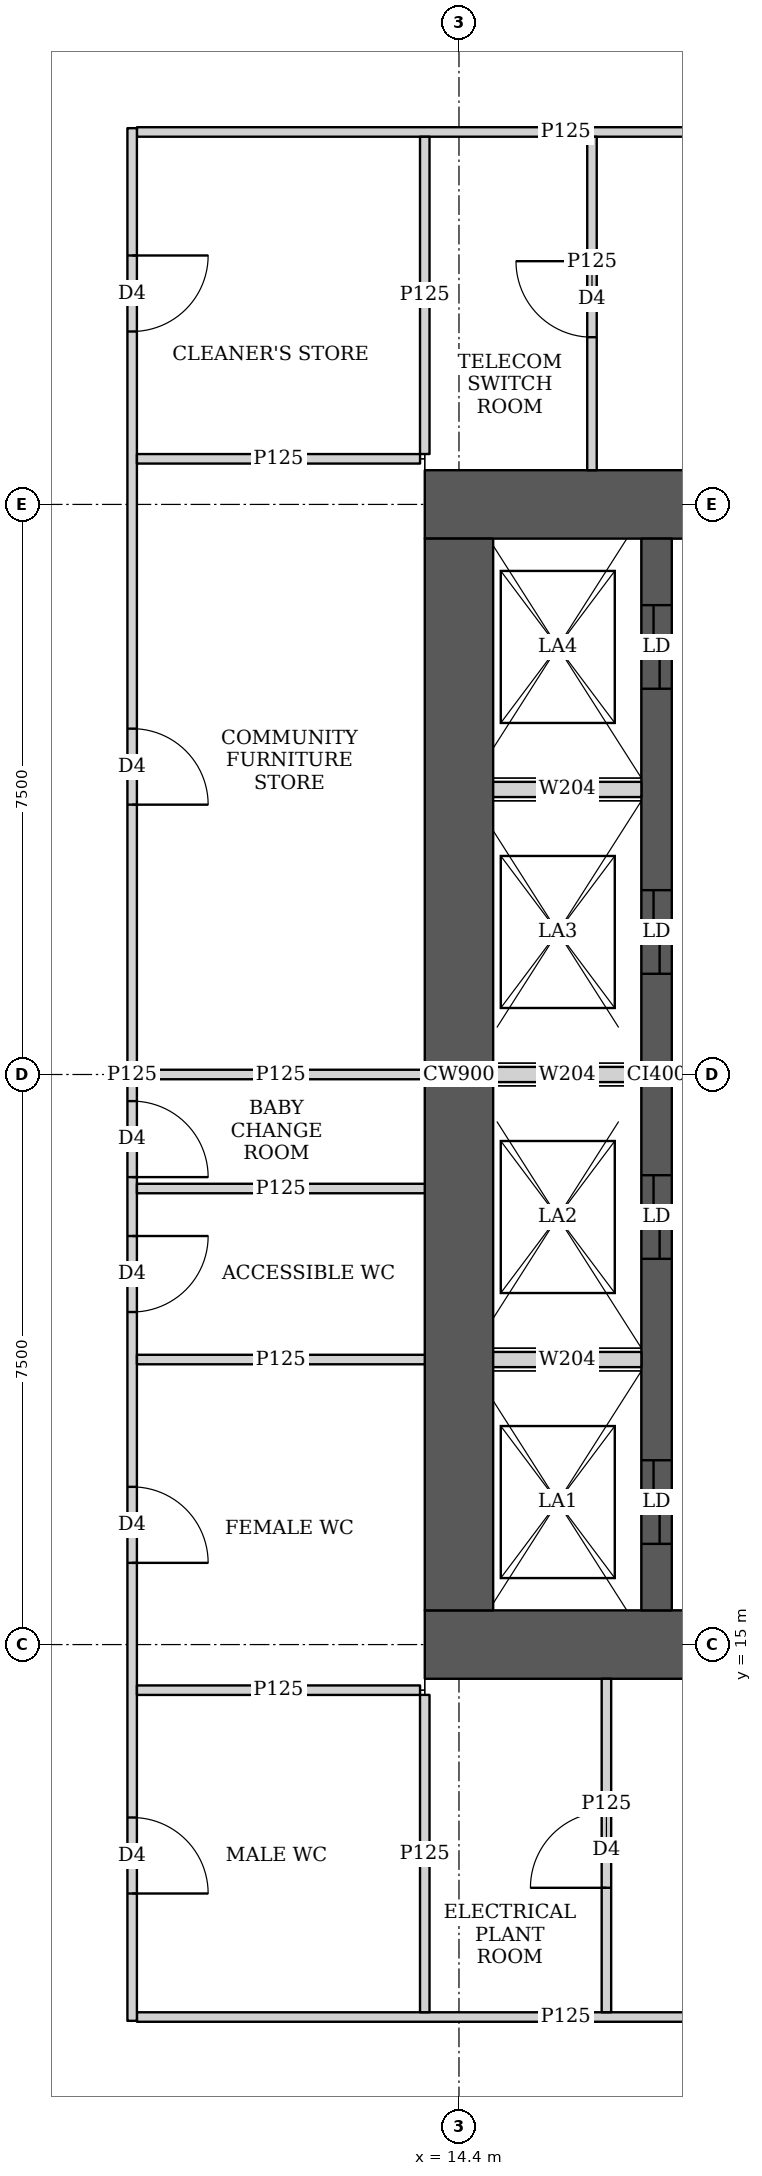
"""IFC4 building model, lengths in metres.
Left out: names, types, materials, properties, quantities, classifications, styles, units other than length and angle.
Written with IfcOpenShell. Run it as: python <this file> out.ifc"""

import sys

from ifc_helpers import new_model, si_unit, direction, frame, frame_2d, origin, place, context, subcontext, project, spatial, rectangle, extrude, element, fill, save


model = new_model("IFC4")
c1 = context("Model", 3, precision=1e-05, world=origin(), true_north=direction((0.0, 1.0)))
c2 = subcontext(c1, "Body", "Model", "MODEL_VIEW")
j1 = project(units=[si_unit("LENGTHUNIT", "METRE"), si_unit("PLANEANGLEUNIT", "RADIAN")], contexts=[c1])
p1 = place(None, origin())
s1 = spatial("IfcSite", under=j1, at=p1, CompositionType="ELEMENT")
p2 = place(p1, origin())
s2 = spatial("IfcBuilding", under=s1, at=p2, CompositionType="ELEMENT")
p3 = place(p2, frame((0.0, 0.0, 130.4)))
s3 = spatial("IfcBuildingStorey", under=s2, at=p3, CompositionType="ELEMENT", Elevation=130.4)
p4 = place(p3, frame((13.95, 15.0, 0.0), z_axis=(0.0, 0.0, 1.0), x_axis=(1.0, 0.0, 0.0)))
e1 = element("IfcWall", 1, at=p4, inside=s3, PredefinedType="SHEAR", context=c2, shape_type="SweptSolid", body=[
    extrude(rectangle(XDim=15.3, YDim=0.9, at=frame_2d((7.65, 0.0))), origin(), (0.0, 0.0, 1.0), 5.4),
])
p5 = place(p4, frame((4.45, 0.0, 0.0)))
e2 = element("IfcOpeningElement", 2, at=p5, cuts=e1, PredefinedType="OPENING", context=c2, shape_type="SweptSolid", body=[
    extrude(rectangle(XDim=1.8, YDim=2.1, at=frame_2d((0.9, 1.05))), frame((0.0, 0.46, 0.0), z_axis=(0.0, -1.0, 0.0), x_axis=(1.0, 0.0, 0.0)), (0.0, 0.0, 1.0), 0.92),
])
p6 = place(p4, frame((10.7, 0.0, 0.0)))
e3 = element("IfcOpeningElement", 3, at=p6, cuts=e1, PredefinedType="OPENING", context=c2, shape_type="SweptSolid", body=[
    extrude(rectangle(XDim=1.1, YDim=2.1, at=frame_2d((0.55, 1.05))), frame((0.0, 0.46, 0.0), z_axis=(0.0, -1.0, 0.0), x_axis=(1.0, 0.0, 0.0)), (0.0, 0.0, 1.0), 0.92),
])
p7 = place(p3, frame((13.95, 30.0, 0.0), z_axis=(0.0, 0.0, 1.0), x_axis=(1.0, 0.0, 0.0)))
e4 = element("IfcWall", 4, at=p7, inside=s3, PredefinedType="SHEAR", context=c2, shape_type="SweptSolid", body=[
    extrude(rectangle(XDim=15.3, YDim=0.9, at=frame_2d((7.65, 0.0))), origin(), (0.0, 0.0, 1.0), 5.4),
])
p8 = place(p7, frame((4.45, 0.0, 0.0)))
e5 = element("IfcOpeningElement", 5, at=p8, cuts=e4, PredefinedType="OPENING", context=c2, shape_type="SweptSolid", body=[
    extrude(rectangle(XDim=1.8, YDim=2.1, at=frame_2d((0.9, 1.05))), frame((0.0, 0.46, 0.0), z_axis=(0.0, -1.0, 0.0), x_axis=(1.0, 0.0, 0.0)), (0.0, 0.0, 1.0), 0.92),
])
p9 = place(p7, frame((10.7, 0.0, 0.0)))
e6 = element("IfcOpeningElement", 6, at=p9, cuts=e4, PredefinedType="OPENING", context=c2, shape_type="SweptSolid", body=[
    extrude(rectangle(XDim=1.1, YDim=2.1, at=frame_2d((0.55, 1.05))), frame((0.0, 0.46, 0.0), z_axis=(0.0, -1.0, 0.0), x_axis=(1.0, 0.0, 0.0)), (0.0, 0.0, 1.0), 0.92),
])
p10 = place(p3, frame((14.4, 15.45, 0.0), z_axis=(0.0, 0.0, 1.0), x_axis=(0.0, 1.0, 0.0)))
e7 = element("IfcWall", 7, at=p10, inside=s3, PredefinedType="SHEAR", context=c2, shape_type="SweptSolid", body=[
    extrude(rectangle(XDim=14.1, YDim=0.9, at=frame_2d((7.05, 0.0))), origin(), (0.0, 0.0, 1.0), 5.4),
])
p11 = place(p3, frame((17.0, 15.45, 0.0), z_axis=(0.0, 0.0, 1.0), x_axis=(0.0, 1.0, 0.0)))
e8 = element("IfcWall", 8, at=p11, inside=s3, PredefinedType="SHEAR", context=c2, shape_type="SweptSolid", body=[
    extrude(rectangle(XDim=14.1, YDim=0.4, at=frame_2d((7.05, 0.0))), origin(), (0.0, 0.0, 1.0), 5.4),
])
p12 = place(p11, frame((0.875, 0.0, 0.0)))
e9 = element("IfcOpeningElement", 9, at=p12, cuts=e8, PredefinedType="OPENING", context=c2, shape_type="SweptSolid", body=[
    extrude(rectangle(XDim=1.1, YDim=2.1, at=frame_2d((0.55, 1.05))), frame((0.0, 0.21, 0.0), z_axis=(0.0, -1.0, 0.0), x_axis=(1.0, 0.0, 0.0)), (0.0, 0.0, 1.0), 0.42),
])
p13 = place(p11, frame((4.625, 0.0, 0.0)))
e10 = element("IfcOpeningElement", 10, at=p13, cuts=e8, PredefinedType="OPENING", context=c2, shape_type="SweptSolid", body=[
    extrude(rectangle(XDim=1.1, YDim=2.1, at=frame_2d((0.55, 1.05))), frame((0.0, 0.21, 0.0), z_axis=(0.0, -1.0, 0.0), x_axis=(1.0, 0.0, 0.0)), (0.0, 0.0, 1.0), 0.42),
])
p14 = place(p11, frame((8.375, 0.0, 0.0)))
e11 = element("IfcOpeningElement", 11, at=p14, cuts=e8, PredefinedType="OPENING", context=c2, shape_type="SweptSolid", body=[
    extrude(rectangle(XDim=1.1, YDim=2.1, at=frame_2d((0.55, 1.05))), frame((0.0, 0.21, 0.0), z_axis=(0.0, -1.0, 0.0), x_axis=(1.0, 0.0, 0.0)), (0.0, 0.0, 1.0), 0.42),
])
p15 = place(p11, frame((12.125, 0.0, 0.0)))
e12 = element("IfcOpeningElement", 12, at=p15, cuts=e8, PredefinedType="OPENING", context=c2, shape_type="SweptSolid", body=[
    extrude(rectangle(XDim=1.1, YDim=2.1, at=frame_2d((0.55, 1.05))), frame((0.0, 0.21, 0.0), z_axis=(0.0, -1.0, 0.0), x_axis=(1.0, 0.0, 0.0)), (0.0, 0.0, 1.0), 0.42),
])
p16 = place(p3, frame((10.1, 10.05, 0.0), z_axis=(0.0, 0.0, 1.0), x_axis=(0.0, 1.0, 0.0)))
e13 = element("IfcWall", 13, at=p16, inside=s3, PredefinedType="PARTITIONING", context=c2, shape_type="SweptSolid", body=[
    extrude(rectangle(XDim=24.9, YDim=0.125, at=frame_2d((12.45, 0.0))), origin(), (0.0, 0.0, 1.0), 3.55),
])
p17 = place(p16, frame((1.675, 0.0, 0.0)))
e14 = element("IfcOpeningElement", 14, at=p17, cuts=e13, PredefinedType="OPENING", context=c2, shape_type="SweptSolid", body=[
    extrude(rectangle(XDim=1.0, YDim=2.1, at=frame_2d((0.5, 1.05))), frame((0.0, 0.073, 0.0), z_axis=(0.0, -1.0, 0.0), x_axis=(1.0, 0.0, 0.0)), (0.0, 0.0, 1.0), 0.145),
])
p18 = place(p16, frame((16.0, 0.0, 0.0)))
e15 = element("IfcOpeningElement", 15, at=p18, cuts=e13, PredefinedType="OPENING", context=c2, shape_type="SweptSolid", body=[
    extrude(rectangle(XDim=1.0, YDim=2.1, at=frame_2d((0.5, 1.05))), frame((0.0, 0.073, 0.0), z_axis=(0.0, -1.0, 0.0), x_axis=(1.0, 0.0, 0.0)), (0.0, 0.0, 1.0), 0.145),
])
p19 = place(p16, frame((22.225, 0.0, 0.0)))
e16 = element("IfcOpeningElement", 16, at=p19, cuts=e13, PredefinedType="OPENING", context=c2, shape_type="SweptSolid", body=[
    extrude(rectangle(XDim=1.0, YDim=2.1, at=frame_2d((0.5, 1.05))), frame((0.0, 0.073, 0.0), z_axis=(0.0, -1.0, 0.0), x_axis=(1.0, 0.0, 0.0)), (0.0, 0.0, 1.0), 0.145),
])
p20 = place(p16, frame((6.025, 0.0, 0.0)))
e17 = element("IfcOpeningElement", 17, at=p20, cuts=e13, PredefinedType="OPENING", context=c2, shape_type="SweptSolid", body=[
    extrude(rectangle(XDim=1.0, YDim=2.1, at=frame_2d((0.5, 1.05))), frame((0.0, 0.073, 0.0), z_axis=(0.0, -1.0, 0.0), x_axis=(1.0, 0.0, 0.0)), (0.0, 0.0, 1.0), 0.145),
])
p21 = place(p16, frame((9.325, 0.0, 0.0)))
e18 = element("IfcOpeningElement", 18, at=p21, cuts=e13, PredefinedType="OPENING", context=c2, shape_type="SweptSolid", body=[
    extrude(rectangle(XDim=1.0, YDim=2.1, at=frame_2d((0.5, 1.05))), frame((0.0, 0.073, 0.0), z_axis=(0.0, -1.0, 0.0), x_axis=(1.0, 0.0, 0.0)), (0.0, 0.0, 1.0), 0.145),
])
p22 = place(p16, frame((11.1, 0.0, 0.0)))
e19 = element("IfcOpeningElement", 19, at=p22, cuts=e13, PredefinedType="OPENING", context=c2, shape_type="SweptSolid", body=[
    extrude(rectangle(XDim=1.0, YDim=2.1, at=frame_2d((0.5, 1.05))), frame((0.0, 0.073, 0.0), z_axis=(0.0, -1.0, 0.0), x_axis=(1.0, 0.0, 0.0)), (0.0, 0.0, 1.0), 0.145),
])
p23 = place(p3, frame((10.163, 14.4, 0.0), z_axis=(0.0, 0.0, 1.0), x_axis=(1.0, 0.0, 0.0)))
e20 = element("IfcWall", 20, at=p23, inside=s3, PredefinedType="PARTITIONING", context=c2, shape_type="SweptSolid", body=[
    extrude(rectangle(XDim=3.725, YDim=0.125, at=frame_2d((1.862, 0.0))), origin(), (0.0, 0.0, 1.0), 3.55),
])
p24 = place(p3, frame((10.163, 22.5, 0.0), z_axis=(0.0, 0.0, 1.0), x_axis=(1.0, 0.0, 0.0)))
e21 = element("IfcWall", 21, at=p24, inside=s3, PredefinedType="PARTITIONING", context=c2, shape_type="SweptSolid", body=[
    extrude(rectangle(XDim=3.787, YDim=0.125, at=frame_2d((1.894, 0.0))), origin(), (0.0, 0.0, 1.0), 3.55),
])
p25 = place(p3, frame((10.163, 30.6, 0.0), z_axis=(0.0, 0.0, 1.0), x_axis=(1.0, 0.0, 0.0)))
e22 = element("IfcWall", 22, at=p25, inside=s3, PredefinedType="PARTITIONING", context=c2, shape_type="SweptSolid", body=[
    extrude(rectangle(XDim=3.725, YDim=0.125, at=frame_2d((1.862, 0.0))), origin(), (0.0, 0.0, 1.0), 3.55),
])
p26 = place(p3, frame((13.95, 10.163, 0.0), z_axis=(0.0, 0.0, 1.0), x_axis=(0.0, 1.0, 0.0)))
e23 = element("IfcWall", 23, at=p26, inside=s3, PredefinedType="PARTITIONING", context=c2, shape_type="SweptSolid", body=[
    extrude(rectangle(XDim=4.175, YDim=0.125, at=frame_2d((2.087, 0.0))), origin(), (0.0, 0.0, 1.0), 3.55),
])
p27 = place(p3, frame((13.95, 30.663, 0.0), z_axis=(0.0, 0.0, 1.0), x_axis=(0.0, 1.0, 0.0)))
e24 = element("IfcWall", 24, at=p27, inside=s3, PredefinedType="PARTITIONING", context=c2, shape_type="SweptSolid", body=[
    extrude(rectangle(XDim=4.174, YDim=0.125, at=frame_2d((2.087, 0.0))), origin(), (0.0, 0.0, 1.0), 3.55),
])
p28 = place(p3, frame((10.163, 10.1, 0.0), z_axis=(0.0, 0.0, 1.0), x_axis=(1.0, 0.0, 0.0)))
e25 = element("IfcWall", 25, at=p28, inside=s3, PredefinedType="PARTITIONING", context=c2, shape_type="SweptSolid", body=[
    extrude(rectangle(XDim=11.287, YDim=0.125, at=frame_2d((5.644, 0.0))), origin(), (0.0, 0.0, 1.0), 3.15),
])
p29 = place(p28, frame((7.832, 0.0, 0.0)))
e26 = element("IfcOpeningElement", 26, at=p29, cuts=e25, PredefinedType="OPENING", context=c2, shape_type="SweptSolid", body=[
    extrude(rectangle(XDim=1.8, YDim=2.1, at=frame_2d((0.9, 1.05))), frame((0.0, 0.073, 0.0), z_axis=(0.0, -1.0, 0.0), x_axis=(1.0, 0.0, 0.0)), (0.0, 0.0, 1.0), 0.145),
])
p30 = place(p3, frame((10.163, 34.9, 0.0), z_axis=(0.0, 0.0, 1.0), x_axis=(1.0, 0.0, 0.0)))
e27 = element("IfcWall", 27, at=p30, inside=s3, PredefinedType="PARTITIONING", context=c2, shape_type="SweptSolid", body=[
    extrude(rectangle(XDim=11.287, YDim=0.125, at=frame_2d((5.644, 0.0))), origin(), (0.0, 0.0, 1.0), 3.15),
])
p31 = place(p30, frame((7.737, 0.0, 0.0)))
e28 = element("IfcOpeningElement", 28, at=p31, cuts=e27, PredefinedType="OPENING", context=c2, shape_type="SweptSolid", body=[
    extrude(rectangle(XDim=1.8, YDim=2.1, at=frame_2d((0.9, 1.05))), frame((0.0, 0.073, 0.0), z_axis=(0.0, -1.0, 0.0), x_axis=(1.0, 0.0, 0.0)), (0.0, 0.0, 1.0), 0.145),
])
p32 = place(p3, frame((16.34, 10.163, 0.0), z_axis=(0.0, 0.0, 1.0), x_axis=(0.0, 1.0, 0.0)))
e29 = element("IfcWall", 29, at=p32, inside=s3, PredefinedType="PARTITIONING", context=c2, shape_type="SweptSolid", body=[
    extrude(rectangle(XDim=4.387, YDim=0.125, at=frame_2d((2.193, 0.0))), origin(), (0.0, 0.0, 1.0), 5.15),
])
p33 = place(p32, frame((1.637, 0.0, 0.0)))
e30 = element("IfcOpeningElement", 30, at=p33, cuts=e29, PredefinedType="OPENING", context=c2, shape_type="SweptSolid", body=[
    extrude(rectangle(XDim=1.0, YDim=2.1, at=frame_2d((0.5, 1.05))), frame((0.0, 0.073, 0.0), z_axis=(0.0, -1.0, 0.0), x_axis=(1.0, 0.0, 0.0)), (0.0, 0.0, 1.0), 0.145),
])
p34 = place(p3, frame((16.15, 30.45, 0.0), z_axis=(0.0, 0.0, 1.0), x_axis=(0.0, 1.0, 0.0)))
e31 = element("IfcWall", 31, at=p34, inside=s3, PredefinedType="PARTITIONING", context=c2, shape_type="SweptSolid", body=[
    extrude(rectangle(XDim=4.387, YDim=0.125, at=frame_2d((2.193, 0.0))), origin(), (0.0, 0.0, 1.0), 5.15),
])
p35 = place(p34, frame((1.75, 0.0, 0.0)))
e32 = element("IfcOpeningElement", 32, at=p35, cuts=e31, PredefinedType="OPENING", context=c2, shape_type="SweptSolid", body=[
    extrude(rectangle(XDim=1.0, YDim=2.1, at=frame_2d((0.5, 1.05))), frame((0.0, 0.073, 0.0), z_axis=(0.0, -1.0, 0.0), x_axis=(1.0, 0.0, 0.0)), (0.0, 0.0, 1.0), 0.145),
])
for number, where, z_axis, x_axis in (
    (33, (10.163, 18.75, 0.0), (0.0, 0.0, 1.0), (1.0, 0.0, 0.0)),
    (34, (10.163, 21.0, 0.0), (0.0, 0.0, 1.0), (1.0, 0.0, 0.0)),
):
    element("IfcWall", number, at=place(p3, frame(where, z_axis=z_axis, x_axis=x_axis)), inside=s3, PredefinedType="PARTITIONING", context=c2, shape_type="SweptSolid", body=[
        extrude(rectangle(XDim=3.787, YDim=0.125, at=frame_2d((1.894, 0.0))), origin(), (0.0, 0.0, 1.0), 5.15),
    ])
for number, where, z_axis, x_axis in (
    (35, (14.85, 18.75, 0.0), (0.0, 0.0, 1.0), (1.0, 0.0, 0.0)),
    (36, (14.85, 22.5, 0.0), (0.0, 0.0, 1.0), (1.0, 0.0, 0.0)),
    (37, (14.85, 26.25, 0.0), (0.0, 0.0, 1.0), (1.0, 0.0, 0.0)),
):
    element("IfcWall", number, at=place(p3, frame(where, z_axis=z_axis, x_axis=x_axis)), inside=s3, PredefinedType="SOLIDWALL", context=c2, shape_type="SweptSolid", body=[
        extrude(rectangle(XDim=1.95, YDim=0.2, at=frame_2d((0.975, 0.0))), origin(), (0.0, 0.0, 1.0), 5.15),
    ])
p36 = place(p17, origin())
e38 = element("IfcDoor", 38, at=p36, inside=s3, OperationType="SINGLE_SWING_RIGHT", PredefinedType="DOOR", context=c2, shape_type="SweptSolid", body=[
    extrude(rectangle(XDim=1.0, YDim=2.1, at=frame_2d((0.5, 1.05))), frame((0.0, 0.025, 0.0), z_axis=(0.0, -1.0, 0.0), x_axis=(1.0, 0.0, 0.0)), (0.0, 0.0, 1.0), 0.05),
])
fill(e14, e38)
p37 = place(p18, origin())
e39 = element("IfcDoor", 39, at=p37, inside=s3, OperationType="SINGLE_SWING_RIGHT", PredefinedType="DOOR", context=c2, shape_type="SweptSolid", body=[
    extrude(rectangle(XDim=1.0, YDim=2.1, at=frame_2d((0.5, 1.05))), frame((0.0, 0.025, 0.0), z_axis=(0.0, -1.0, 0.0), x_axis=(1.0, 0.0, 0.0)), (0.0, 0.0, 1.0), 0.05),
])
fill(e15, e39)
p38 = place(p19, origin())
e40 = element("IfcDoor", 40, at=p38, inside=s3, OperationType="SINGLE_SWING_LEFT", PredefinedType="DOOR", context=c2, shape_type="SweptSolid", body=[
    extrude(rectangle(XDim=1.0, YDim=2.1, at=frame_2d((0.5, 1.05))), frame((0.0, 0.025, 0.0), z_axis=(0.0, -1.0, 0.0), x_axis=(1.0, 0.0, 0.0)), (0.0, 0.0, 1.0), 0.05),
])
fill(e16, e40)
p39 = place(p33, origin())
e41 = element("IfcDoor", 41, at=p39, inside=s3, OperationType="SINGLE_SWING_LEFT", PredefinedType="DOOR", context=c2, shape_type="SweptSolid", body=[
    extrude(rectangle(XDim=1.0, YDim=2.1, at=frame_2d((0.5, 1.05))), frame((0.0, 0.025, 0.0), z_axis=(0.0, -1.0, 0.0), x_axis=(1.0, 0.0, 0.0)), (0.0, 0.0, 1.0), 0.05),
])
fill(e30, e41)
p40 = place(p35, origin())
e42 = element("IfcDoor", 42, at=p40, inside=s3, OperationType="SINGLE_SWING_RIGHT", PredefinedType="DOOR", context=c2, shape_type="SweptSolid", body=[
    extrude(rectangle(XDim=1.0, YDim=2.1, at=frame_2d((0.5, 1.05))), frame((0.0, 0.025, 0.0), z_axis=(0.0, -1.0, 0.0), x_axis=(1.0, 0.0, 0.0)), (0.0, 0.0, 1.0), 0.05),
])
fill(e32, e42)
p41 = place(p20, origin())
e43 = element("IfcDoor", 43, at=p41, inside=s3, OperationType="SINGLE_SWING_RIGHT", PredefinedType="DOOR", context=c2, shape_type="SweptSolid", body=[
    extrude(rectangle(XDim=1.0, YDim=2.1, at=frame_2d((0.5, 1.05))), frame((0.0, 0.025, 0.0), z_axis=(0.0, -1.0, 0.0), x_axis=(1.0, 0.0, 0.0)), (0.0, 0.0, 1.0), 0.05),
])
fill(e17, e43)
p42 = place(p21, origin())
e44 = element("IfcDoor", 44, at=p42, inside=s3, OperationType="SINGLE_SWING_LEFT", PredefinedType="DOOR", context=c2, shape_type="SweptSolid", body=[
    extrude(rectangle(XDim=1.0, YDim=2.1, at=frame_2d((0.5, 1.05))), frame((0.0, 0.025, 0.0), z_axis=(0.0, -1.0, 0.0), x_axis=(1.0, 0.0, 0.0)), (0.0, 0.0, 1.0), 0.05),
])
fill(e18, e44)
p43 = place(p22, origin())
e45 = element("IfcDoor", 45, at=p43, inside=s3, OperationType="SINGLE_SWING_RIGHT", PredefinedType="DOOR", context=c2, shape_type="SweptSolid", body=[
    extrude(rectangle(XDim=1.0, YDim=2.1, at=frame_2d((0.5, 1.05))), frame((0.0, 0.025, 0.0), z_axis=(0.0, -1.0, 0.0), x_axis=(1.0, 0.0, 0.0)), (0.0, 0.0, 1.0), 0.05),
])
fill(e19, e45)
p44 = place(p12, origin())
e46 = element("IfcDoor", 46, at=p44, inside=s3, OperationType="DOUBLE_DOOR_SLIDING", PredefinedType="DOOR", context=c2, shape_type="SweptSolid", body=[
    extrude(rectangle(XDim=1.1, YDim=2.1, at=frame_2d((0.55, 1.05))), frame((0.0, 0.025, 0.0), z_axis=(0.0, -1.0, 0.0), x_axis=(1.0, 0.0, 0.0)), (0.0, 0.0, 1.0), 0.05),
])
fill(e9, e46)
p45 = place(p13, origin())
e47 = element("IfcDoor", 47, at=p45, inside=s3, OperationType="DOUBLE_DOOR_SLIDING", PredefinedType="DOOR", context=c2, shape_type="SweptSolid", body=[
    extrude(rectangle(XDim=1.1, YDim=2.1, at=frame_2d((0.55, 1.05))), frame((0.0, 0.025, 0.0), z_axis=(0.0, -1.0, 0.0), x_axis=(1.0, 0.0, 0.0)), (0.0, 0.0, 1.0), 0.05),
])
fill(e10, e47)
p46 = place(p14, origin())
e48 = element("IfcDoor", 48, at=p46, inside=s3, OperationType="DOUBLE_DOOR_SLIDING", PredefinedType="DOOR", context=c2, shape_type="SweptSolid", body=[
    extrude(rectangle(XDim=1.1, YDim=2.1, at=frame_2d((0.55, 1.05))), frame((0.0, 0.025, 0.0), z_axis=(0.0, -1.0, 0.0), x_axis=(1.0, 0.0, 0.0)), (0.0, 0.0, 1.0), 0.05),
])
fill(e11, e48)
p47 = place(p15, origin())
e49 = element("IfcDoor", 49, at=p47, inside=s3, OperationType="DOUBLE_DOOR_SLIDING", PredefinedType="DOOR", context=c2, shape_type="SweptSolid", body=[
    extrude(rectangle(XDim=1.1, YDim=2.1, at=frame_2d((0.55, 1.05))), frame((0.0, 0.025, 0.0), z_axis=(0.0, -1.0, 0.0), x_axis=(1.0, 0.0, 0.0)), (0.0, 0.0, 1.0), 0.05),
])
fill(e12, e49)
save(model, sys.argv[1])
